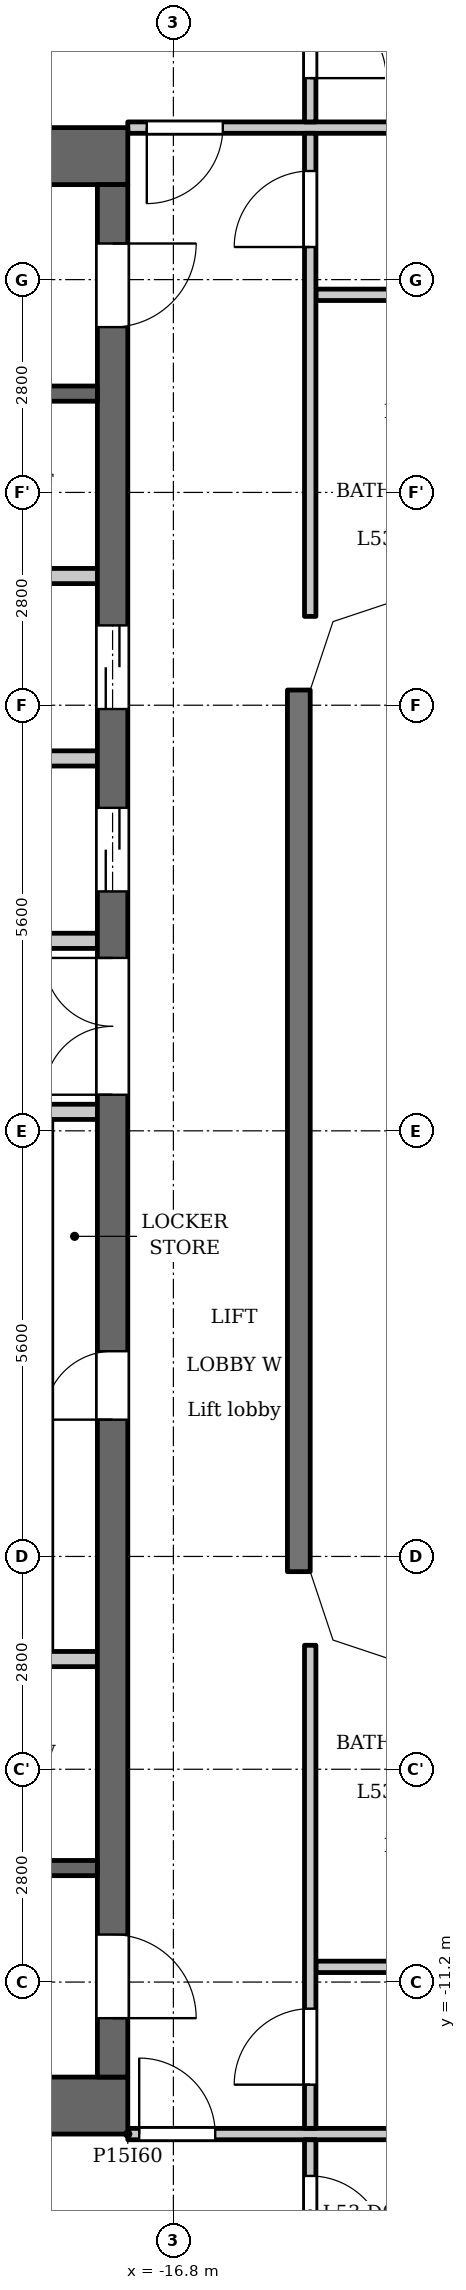
"""IFC4 building model, lengths in metres.
Left out: names, types, materials, properties, quantities, classifications, styles, units other than length and angle.
Written with IfcOpenShell. Run it as: python <this file> out.ifc"""

import sys

from ifc_helpers import new_model, si_unit, direction, frame, frame_2d, origin, place, context, subcontext, project, spatial, polyline, rectangle, outline, extrude, element, fill, save


model = new_model("IFC4")
c1 = context("Model", 3, precision=1e-05, world=origin(), true_north=direction((0.0, 1.0)))
c2 = subcontext(c1, "Body", "Model", "MODEL_VIEW")
j1 = project(units=[si_unit("LENGTHUNIT", "METRE"), si_unit("PLANEANGLEUNIT", "RADIAN")], contexts=[c1])
p1 = place(None, origin())
s1 = spatial("IfcSite", under=j1, at=p1, CompositionType="ELEMENT")
p2 = place(p1, origin())
s2 = spatial("IfcBuilding", under=s1, at=p2, CompositionType="ELEMENT")
p3 = place(p2, frame((0.0, 0.0, 206.4)))
s3 = spatial("IfcBuildingStorey", under=s2, at=p3, CompositionType="ELEMENT", Elevation=206.4)
p4 = place(p3, frame((-15.15, -5.8, 0.0), z_axis=(0.0, 0.0, 1.0), x_axis=(0.0, 1.0, 0.0)))
e1 = element("IfcWall", 1, at=p4, inside=s3, PredefinedType="SOLIDWALL", context=c2, shape_type="SweptSolid", body=[
    extrude(rectangle(XDim=11.6, YDim=0.3, at=frame_2d((5.8, 0.0))), origin(), (0.0, 0.0, 1.0), 3.2),
])
for number, where, z_axis, x_axis in (
    (2, (-17.4, 12.825, 0.0), (0.0, 0.0, 1.0), (-1.0, 0.0, 0.0)),
    (3, (-17.4, -12.825, 0.0), (0.0, 0.0, 1.0), (-1.0, 0.0, 0.0)),
):
    element("IfcWall", number, at=place(p3, frame(where, z_axis=z_axis, x_axis=x_axis)), inside=s3, PredefinedType="SHEAR", context=c2, shape_type="SweptSolid", body=[
        extrude(rectangle(XDim=7.6, YDim=0.75, at=frame_2d((3.8, 0.0))), origin(), (0.0, 0.0, 1.0), 3.2),
    ])
p5 = place(p3, frame((-17.6, -12.45, 0.0), z_axis=(0.0, 0.0, 1.0), x_axis=(0.0, 1.0, 0.0)))
e4 = element("IfcWall", 4, at=p5, inside=s3, PredefinedType="SHEAR", context=c2, shape_type="SweptSolid", body=[
    extrude(rectangle(XDim=24.9, YDim=0.4, at=frame_2d((12.45, 0.0))), origin(), (0.0, 0.0, 1.0), 3.2),
])
p6 = place(p5, frame((8.65, 0.0, 0.0)))
e5 = element("IfcOpeningElement", 5, at=p6, cuts=e4, PredefinedType="OPENING", context=c2, shape_type="SweptSolid", body=[
    extrude(rectangle(XDim=0.9, YDim=2.1, at=frame_2d((0.45, 1.05))), frame((0.0, 0.21, 0.0), z_axis=(0.0, -1.0, 0.0), x_axis=(1.0, 0.0, 0.0)), (0.0, 0.0, 1.0), 0.42),
])
p7 = place(p5, frame((15.6, 0.0, 0.0)))
e6 = element("IfcOpeningElement", 6, at=p7, cuts=e4, PredefinedType="OPENING", context=c2, shape_type="SweptSolid", body=[
    extrude(rectangle(XDim=1.1, YDim=2.1, at=frame_2d((0.55, 1.05))), frame((0.0, 0.21, 0.0), z_axis=(0.0, -1.0, 0.0), x_axis=(1.0, 0.0, 0.0)), (0.0, 0.0, 1.0), 0.42),
])
p8 = place(p5, frame((18.0, 0.0, 0.0)))
e7 = element("IfcOpeningElement", 7, at=p8, cuts=e4, PredefinedType="OPENING", context=c2, shape_type="SweptSolid", body=[
    extrude(rectangle(XDim=1.1, YDim=2.1, at=frame_2d((0.55, 1.05))), frame((0.0, 0.21, 0.0), z_axis=(0.0, -1.0, 0.0), x_axis=(1.0, 0.0, 0.0)), (0.0, 0.0, 1.0), 0.42),
])
p9 = place(p5, frame((23.025, 0.0, 0.0)))
e8 = element("IfcOpeningElement", 8, at=p9, cuts=e4, PredefinedType="OPENING", context=c2, shape_type="SweptSolid", body=[
    extrude(rectangle(XDim=1.1, YDim=2.1, at=frame_2d((0.55, 1.05))), frame((0.0, 0.21, 0.0), z_axis=(0.0, -1.0, 0.0), x_axis=(1.0, 0.0, 0.0)), (0.0, 0.0, 1.0), 0.42),
])
p10 = place(p5, frame((0.775, 0.0, 0.0)))
e9 = element("IfcOpeningElement", 9, at=p10, cuts=e4, PredefinedType="OPENING", context=c2, shape_type="SweptSolid", body=[
    extrude(rectangle(XDim=1.1, YDim=2.1, at=frame_2d((0.55, 1.05))), frame((0.0, 0.21, 0.0), z_axis=(0.0, -1.0, 0.0), x_axis=(1.0, 0.0, 0.0)), (0.0, 0.0, 1.0), 0.42),
])
p11 = place(p5, frame((12.925, 0.0, 0.0)))
e10 = element("IfcOpeningElement", 10, at=p11, cuts=e4, PredefinedType="OPENING", context=c2, shape_type="SweptSolid", body=[
    extrude(rectangle(XDim=1.8, YDim=2.1, at=frame_2d((0.9, 1.05))), frame((0.0, 0.21, 0.0), z_axis=(0.0, -1.0, 0.0), x_axis=(1.0, 0.0, 0.0)), (0.0, 0.0, 1.0), 0.42),
])
p12 = place(p3, frame((-17.8, -9.7, 0.0), z_axis=(0.0, 0.0, 1.0), x_axis=(-1.0, 0.0, 0.0)))
e11 = element("IfcWall", 11, at=p12, inside=s3, PredefinedType="SHEAR", context=c2, shape_type="SweptSolid", body=[
    extrude(rectangle(XDim=5.65, YDim=0.2, at=frame_2d((2.825, 0.0))), origin(), (0.0, 0.0, 1.0), 3.2),
])
p13 = place(p12, frame((0.85, 0.0, 0.0)))
e12 = element("IfcOpeningElement", 12, at=p13, cuts=e11, PredefinedType="OPENING", context=c2, shape_type="SweptSolid", body=[
    extrude(rectangle(XDim=1.1, YDim=2.1, at=frame_2d((0.55, 1.05))), frame((0.0, 0.11, 0.0), z_axis=(0.0, -1.0, 0.0), x_axis=(1.0, 0.0, 0.0)), (0.0, 0.0, 1.0), 0.22),
])
p14 = place(p12, frame((3.75, 0.0, 0.0)))
e13 = element("IfcOpeningElement", 13, at=p14, cuts=e11, PredefinedType="OPENING", context=c2, shape_type="SweptSolid", body=[
    extrude(rectangle(XDim=1.1, YDim=2.1, at=frame_2d((0.55, 1.05))), frame((0.0, 0.11, 0.0), z_axis=(0.0, -1.0, 0.0), x_axis=(1.0, 0.0, 0.0)), (0.0, 0.0, 1.0), 0.22),
])
p15 = place(p3, frame((-17.8, -6.95, 0.0), z_axis=(0.0, 0.0, 1.0), x_axis=(-1.0, 0.0, 0.0)))
e14 = element("IfcWall", 14, at=p15, inside=s3, PredefinedType="PARTITIONING", context=c2, shape_type="SweptSolid", body=[
    extrude(rectangle(XDim=2.8, YDim=0.2, at=frame_2d((1.4, 0.0))), origin(), (0.0, 0.0, 1.0), 3.2),
])
p16 = place(p3, frame((-17.8, 0.25, 0.0), z_axis=(0.0, 0.0, 1.0), x_axis=(-1.0, 0.0, 0.0)))
e15 = element("IfcWall", 15, at=p16, inside=s3, PredefinedType="PARTITIONING", context=c2, shape_type="SweptSolid", body=[
    extrude(rectangle(XDim=3.0, YDim=0.2, at=frame_2d((1.5, 0.0))), origin(), (0.0, 0.0, 1.0), 3.2),
])
p17 = place(p16, frame((1.35, 0.0, 0.0)))
e16 = element("IfcOpeningElement", 16, at=p17, cuts=e15, PredefinedType="OPENING", context=c2, shape_type="SweptSolid", body=[
    extrude(rectangle(XDim=0.9, YDim=2.1, at=frame_2d((0.45, 1.05))), frame((0.0, 0.11, 0.0), z_axis=(0.0, -1.0, 0.0), x_axis=(1.0, 0.0, 0.0)), (0.0, 0.0, 1.0), 0.22),
])
p18 = place(p3, frame((-17.8, 2.5, 0.0), z_axis=(0.0, 0.0, 1.0), x_axis=(-1.0, 0.0, 0.0)))
e17 = element("IfcWall", 17, at=p18, inside=s3, PredefinedType="PARTITIONING", context=c2, shape_type="SweptSolid", body=[
    extrude(rectangle(XDim=3.0, YDim=0.2, at=frame_2d((1.5, 0.0))), origin(), (0.0, 0.0, 1.0), 3.2),
])
for number, where, z_axis, x_axis in (
    (18, (-17.8, 4.9, 0.0), (0.0, 0.0, 1.0), (-1.0, 0.0, 0.0)),
    (19, (-17.8, 7.3, 0.0), (0.0, 0.0, 1.0), (-1.0, 0.0, 0.0)),
):
    element("IfcWall", number, at=place(p3, frame(where, z_axis=z_axis, x_axis=x_axis)), inside=s3, PredefinedType="PARTITIONING", context=c2, shape_type="SweptSolid", body=[
        extrude(rectangle(XDim=2.8, YDim=0.2, at=frame_2d((1.4, 0.0))), origin(), (0.0, 0.0, 1.0), 3.2),
    ])
p19 = place(p3, frame((-17.8, 9.7, 0.0), z_axis=(0.0, 0.0, 1.0), x_axis=(-1.0, 0.0, 0.0)))
e20 = element("IfcWall", 20, at=p19, inside=s3, PredefinedType="SHEAR", context=c2, shape_type="SweptSolid", body=[
    extrude(rectangle(XDim=5.65, YDim=0.2, at=frame_2d((2.825, 0.0))), origin(), (0.0, 0.0, 1.0), 3.2),
])
p20 = place(p19, frame((0.85, 0.0, 0.0)))
e21 = element("IfcOpeningElement", 21, at=p20, cuts=e20, PredefinedType="OPENING", context=c2, shape_type="SweptSolid", body=[
    extrude(rectangle(XDim=1.1, YDim=2.1, at=frame_2d((0.55, 1.05))), frame((0.0, 0.11, 0.0), z_axis=(0.0, -1.0, 0.0), x_axis=(1.0, 0.0, 0.0)), (0.0, 0.0, 1.0), 0.22),
])
p21 = place(p19, frame((3.75, 0.0, 0.0)))
e22 = element("IfcOpeningElement", 22, at=p21, cuts=e20, PredefinedType="OPENING", context=c2, shape_type="SweptSolid", body=[
    extrude(rectangle(XDim=1.1, YDim=2.1, at=frame_2d((0.55, 1.05))), frame((0.0, 0.11, 0.0), z_axis=(0.0, -1.0, 0.0), x_axis=(1.0, 0.0, 0.0)), (0.0, 0.0, 1.0), 0.22),
])
p22 = place(p3, frame((-17.4, -13.2, 0.0), z_axis=(0.0, 0.0, 1.0), x_axis=(1.0, 0.0, 0.0)))
e23 = element("IfcWall", 23, at=p22, inside=s3, PredefinedType="PARTITIONING", context=c2, shape_type="SweptSolid", body=[
    extrude(rectangle(XDim=34.8, YDim=0.15, at=frame_2d((17.4, 0.0))), origin(), (0.0, 0.0, 1.0), 3.2),
])
p23 = place(p22, frame((0.15, 0.0, 0.0)))
e24 = element("IfcOpeningElement", 24, at=p23, cuts=e23, PredefinedType="OPENING", context=c2, shape_type="SweptSolid", body=[
    extrude(rectangle(XDim=1.0, YDim=2.1, at=frame_2d((0.5, 1.05))), frame((0.0, 0.085, 0.0), z_axis=(0.0, -1.0, 0.0), x_axis=(1.0, 0.0, 0.0)), (0.0, 0.0, 1.0), 0.17),
])
p24 = place(p22, frame((33.55, 0.0, 0.0)))
e25 = element("IfcOpeningElement", 25, at=p24, cuts=e23, PredefinedType="OPENING", context=c2, shape_type="SweptSolid", body=[
    extrude(rectangle(XDim=1.0, YDim=2.1, at=frame_2d((0.5, 1.05))), frame((0.0, 0.085, 0.0), z_axis=(0.0, -1.0, 0.0), x_axis=(1.0, 0.0, 0.0)), (0.0, 0.0, 1.0), 0.17),
])
p25 = place(p3, frame((-14.925, -11.0, 0.0), z_axis=(0.0, 0.0, 1.0), x_axis=(1.0, 0.0, 0.0)))
e26 = element("IfcWall", 26, at=p25, inside=s3, PredefinedType="PARTITIONING", context=c2, shape_type="SweptSolid", body=[
    extrude(rectangle(XDim=29.85, YDim=0.15, at=frame_2d((14.925, 0.0))), origin(), (0.0, 0.0, 1.0), 3.2),
])
p26 = place(p25, frame((2.575, 0.0, 0.0)))
e27 = element("IfcOpeningElement", 27, at=p26, cuts=e26, PredefinedType="OPENING", context=c2, shape_type="SweptSolid", body=[
    extrude(rectangle(XDim=1.0, YDim=2.1, at=frame_2d((0.5, 1.05))), frame((0.0, 0.085, 0.0), z_axis=(0.0, -1.0, 0.0), x_axis=(1.0, 0.0, 0.0)), (0.0, 0.0, 1.0), 0.17),
])
p27 = place(p25, frame((26.375, 0.0, 0.0)))
e28 = element("IfcOpeningElement", 28, at=p27, cuts=e26, PredefinedType="OPENING", context=c2, shape_type="SweptSolid", body=[
    extrude(rectangle(XDim=1.0, YDim=2.1, at=frame_2d((0.5, 1.05))), frame((0.0, 0.085, 0.0), z_axis=(0.0, -1.0, 0.0), x_axis=(1.0, 0.0, 0.0)), (0.0, 0.0, 1.0), 0.17),
])
p28 = place(p3, frame((-14.925, 11.0, 0.0), z_axis=(0.0, 0.0, 1.0), x_axis=(1.0, 0.0, 0.0)))
e29 = element("IfcWall", 29, at=p28, inside=s3, PredefinedType="PARTITIONING", context=c2, shape_type="SweptSolid", body=[
    extrude(rectangle(XDim=29.85, YDim=0.15, at=frame_2d((14.925, 0.0))), origin(), (0.0, 0.0, 1.0), 3.2),
])
p29 = place(p28, frame((2.475, 0.0, 0.0)))
e30 = element("IfcOpeningElement", 30, at=p29, cuts=e29, PredefinedType="OPENING", context=c2, shape_type="SweptSolid", body=[
    extrude(rectangle(XDim=1.0, YDim=2.1, at=frame_2d((0.5, 1.05))), frame((0.0, 0.085, 0.0), z_axis=(0.0, -1.0, 0.0), x_axis=(1.0, 0.0, 0.0)), (0.0, 0.0, 1.0), 0.17),
])
p30 = place(p28, frame((17.975, 0.0, 0.0)))
e31 = element("IfcOpeningElement", 31, at=p30, cuts=e29, PredefinedType="OPENING", context=c2, shape_type="SweptSolid", body=[
    extrude(rectangle(XDim=1.0, YDim=2.1, at=frame_2d((0.5, 1.05))), frame((0.0, 0.085, 0.0), z_axis=(0.0, -1.0, 0.0), x_axis=(1.0, 0.0, 0.0)), (0.0, 0.0, 1.0), 0.17),
])
p31 = place(p3, frame((-17.4, 13.2, 0.0), z_axis=(0.0, 0.0, 1.0), x_axis=(1.0, 0.0, 0.0)))
e32 = element("IfcWall", 32, at=p31, inside=s3, PredefinedType="PARTITIONING", context=c2, shape_type="SweptSolid", body=[
    extrude(rectangle(XDim=34.8, YDim=0.15, at=frame_2d((17.4, 0.0))), origin(), (0.0, 0.0, 1.0), 3.2),
])
p32 = place(p31, frame((0.25, 0.0, 0.0)))
e33 = element("IfcOpeningElement", 33, at=p32, cuts=e32, PredefinedType="OPENING", context=c2, shape_type="SweptSolid", body=[
    extrude(rectangle(XDim=1.0, YDim=2.1, at=frame_2d((0.5, 1.05))), frame((0.0, 0.085, 0.0), z_axis=(0.0, -1.0, 0.0), x_axis=(1.0, 0.0, 0.0)), (0.0, 0.0, 1.0), 0.17),
])
p33 = place(p31, frame((33.65, 0.0, 0.0)))
e34 = element("IfcOpeningElement", 34, at=p33, cuts=e32, PredefinedType="OPENING", context=c2, shape_type="SweptSolid", body=[
    extrude(rectangle(XDim=1.0, YDim=2.1, at=frame_2d((0.5, 1.05))), frame((0.0, 0.085, 0.0), z_axis=(0.0, -1.0, 0.0), x_axis=(1.0, 0.0, 0.0)), (0.0, 0.0, 1.0), 0.17),
])
p34 = place(p3, frame((-15.0, -15.325, 0.0), z_axis=(0.0, 0.0, 1.0), x_axis=(0.0, 1.0, 0.0)))
e35 = element("IfcWall", 35, at=p34, inside=s3, PredefinedType="PARTITIONING", context=c2, shape_type="SweptSolid", body=[
    extrude(rectangle(XDim=2.05, YDim=0.15, at=frame_2d((1.025, 0.0))), origin(), (0.0, 0.0, 1.0), 3.2),
])
p35 = place(p34, frame((0.574, 0.0, 0.0)))
e36 = element("IfcOpeningElement", 36, at=p35, cuts=e35, PredefinedType="OPENING", context=c2, shape_type="SweptSolid", body=[
    extrude(rectangle(XDim=1.0, YDim=2.1, at=frame_2d((0.5, 1.05))), frame((0.0, 0.085, 0.0), z_axis=(0.0, -1.0, 0.0), x_axis=(1.0, 0.0, 0.0)), (0.0, 0.0, 1.0), 0.17),
])
p36 = place(p3, frame((-15.0, -13.125, 0.0), z_axis=(0.0, 0.0, 1.0), x_axis=(0.0, 1.0, 0.0)))
e37 = element("IfcWall", 37, at=p36, inside=s3, PredefinedType="PARTITIONING", context=c2, shape_type="SweptSolid", body=[
    extrude(rectangle(XDim=6.356, YDim=0.15, at=frame_2d((3.178, 0.0))), origin(), (0.0, 0.0, 1.0), 3.2),
])
p37 = place(p36, frame((0.575, 0.0, 0.0)))
e38 = element("IfcOpeningElement", 38, at=p37, cuts=e37, PredefinedType="OPENING", context=c2, shape_type="SweptSolid", body=[
    extrude(rectangle(XDim=1.0, YDim=2.1, at=frame_2d((0.5, 1.05))), frame((0.0, 0.085, 0.0), z_axis=(0.0, -1.0, 0.0), x_axis=(1.0, 0.0, 0.0)), (0.0, 0.0, 1.0), 0.17),
])
p38 = place(p3, frame((-15.0, 6.769, 0.0), z_axis=(0.0, 0.0, 1.0), x_axis=(0.0, 1.0, 0.0)))
e39 = element("IfcWall", 39, at=p38, inside=s3, PredefinedType="PARTITIONING", context=c2, shape_type="SweptSolid", body=[
    extrude(rectangle(XDim=6.356, YDim=0.15, at=frame_2d((3.178, 0.0))), origin(), (0.0, 0.0, 1.0), 3.2),
])
p39 = place(p38, frame((4.86, 0.0, 0.0)))
e40 = element("IfcOpeningElement", 40, at=p39, cuts=e39, PredefinedType="OPENING", context=c2, shape_type="SweptSolid", body=[
    extrude(rectangle(XDim=1.0, YDim=2.1, at=frame_2d((0.5, 1.05))), frame((0.0, 0.085, 0.0), z_axis=(0.0, -1.0, 0.0), x_axis=(1.0, 0.0, 0.0)), (0.0, 0.0, 1.0), 0.17),
])
p40 = place(p3, frame((-15.0, 13.275, 0.0), z_axis=(0.0, 0.0, 1.0), x_axis=(0.0, 1.0, 0.0)))
e41 = element("IfcWall", 41, at=p40, inside=s3, PredefinedType="PARTITIONING", context=c2, shape_type="SweptSolid", body=[
    extrude(rectangle(XDim=2.05, YDim=0.15, at=frame_2d((1.025, 0.0))), origin(), (0.0, 0.0, 1.0), 3.2),
])
p41 = place(p40, frame((0.576, 0.0, 0.0)))
e42 = element("IfcOpeningElement", 42, at=p41, cuts=e41, PredefinedType="OPENING", context=c2, shape_type="SweptSolid", body=[
    extrude(rectangle(XDim=1.0, YDim=2.1, at=frame_2d((0.5, 1.05))), frame((0.0, 0.085, 0.0), z_axis=(0.0, -1.0, 0.0), x_axis=(1.0, 0.0, 0.0)), (0.0, 0.0, 1.0), 0.17),
])
p42 = place(p3, origin())
e43 = element("IfcWall", 43, at=p42, inside=s3, PredefinedType="SOLIDWALL", context=c2, shape_type="SweptSolid", body=[
    extrude(outline(polyline([(-13.849, 7.3), (-14.937, 6.937), (-15.3, 5.849), (-15.3, 5.8), (-15.0, 5.8), (-14.7, 6.7), (-13.8, 7.0), (-13.8, 7.3), (-13.849, 7.3)])), origin(), (0.0, 0.0, 1.0), 3.2),
])
e44 = element("IfcWall", 44, at=p42, inside=s3, PredefinedType="SOLIDWALL", context=c2, shape_type="SweptSolid", body=[
    extrude(outline(polyline([(-14.937, -6.937), (-13.849, -7.3), (-13.8, -7.3), (-13.8, -7.0), (-14.7, -6.7), (-15.0, -5.8), (-15.3, -5.8), (-15.3, -5.849), (-14.937, -6.937)])), origin(), (0.0, 0.0, 1.0), 3.2),
])
p43 = place(p6, origin())
e45 = element("IfcDoor", 45, at=p43, inside=s3, OperationType="SINGLE_SWING_RIGHT", PredefinedType="DOOR", context=c2, shape_type="SweptSolid", body=[
    extrude(rectangle(XDim=0.9, YDim=2.1, at=frame_2d((0.45, 1.05))), frame((0.0, 0.025, 0.0), z_axis=(0.0, -1.0, 0.0), x_axis=(1.0, 0.0, 0.0)), (0.0, 0.0, 1.0), 0.05),
])
fill(e5, e45)
p44 = place(p7, origin())
e46 = element("IfcDoor", 46, at=p44, inside=s3, OperationType="DOUBLE_DOOR_SLIDING", PredefinedType="DOOR", context=c2, shape_type="SweptSolid", body=[
    extrude(rectangle(XDim=1.1, YDim=2.1, at=frame_2d((0.55, 1.05))), frame((0.0, 0.025, 0.0), z_axis=(0.0, -1.0, 0.0), x_axis=(1.0, 0.0, 0.0)), (0.0, 0.0, 1.0), 0.05),
])
fill(e6, e46)
p45 = place(p8, origin())
e47 = element("IfcDoor", 47, at=p45, inside=s3, OperationType="DOUBLE_DOOR_SLIDING", PredefinedType="DOOR", context=c2, shape_type="SweptSolid", body=[
    extrude(rectangle(XDim=1.1, YDim=2.1, at=frame_2d((0.55, 1.05))), frame((0.0, 0.025, 0.0), z_axis=(0.0, -1.0, 0.0), x_axis=(1.0, 0.0, 0.0)), (0.0, 0.0, 1.0), 0.05),
])
fill(e7, e47)
p46 = place(p9, origin())
e48 = element("IfcDoor", 48, at=p46, inside=s3, OperationType="SINGLE_SWING_RIGHT", PredefinedType="DOOR", context=c2, shape_type="SweptSolid", body=[
    extrude(rectangle(XDim=1.1, YDim=2.1, at=frame_2d((0.55, 1.05))), frame((0.0, 0.025, 0.0), z_axis=(0.0, -1.0, 0.0), x_axis=(1.0, 0.0, 0.0)), (0.0, 0.0, 1.0), 0.05),
])
fill(e8, e48)
p47 = place(p10, origin())
e49 = element("IfcDoor", 49, at=p47, inside=s3, OperationType="SINGLE_SWING_LEFT", PredefinedType="DOOR", context=c2, shape_type="SweptSolid", body=[
    extrude(rectangle(XDim=1.1, YDim=2.1, at=frame_2d((0.55, 1.05))), frame((0.0, 0.025, 0.0), z_axis=(0.0, -1.0, 0.0), x_axis=(1.0, 0.0, 0.0)), (0.0, 0.0, 1.0), 0.05),
])
fill(e9, e49)
p48 = place(p11, origin())
e50 = element("IfcDoor", 50, at=p48, inside=s3, OperationType="DOUBLE_DOOR_SINGLE_SWING", PredefinedType="DOOR", context=c2, shape_type="SweptSolid", body=[
    extrude(rectangle(XDim=1.8, YDim=2.1, at=frame_2d((0.9, 1.05))), frame((0.0, 0.025, 0.0), z_axis=(0.0, -1.0, 0.0), x_axis=(1.0, 0.0, 0.0)), (0.0, 0.0, 1.0), 0.05),
])
fill(e10, e50)
p49 = place(p39, origin())
e51 = element("IfcDoor", 51, at=p49, inside=s3, OperationType="SINGLE_SWING_RIGHT", PredefinedType="DOOR", context=c2, shape_type="SweptSolid", body=[
    extrude(rectangle(XDim=1.0, YDim=2.1, at=frame_2d((0.5, 1.05))), frame((0.0, 0.025, 0.0), z_axis=(0.0, -1.0, 0.0), x_axis=(1.0, 0.0, 0.0)), (0.0, 0.0, 1.0), 0.05),
])
fill(e40, e51)
p50 = place(p32, origin())
e52 = element("IfcDoor", 52, at=p50, inside=s3, OperationType="SINGLE_SWING_LEFT", PredefinedType="DOOR", context=c2, shape_type="SweptSolid", body=[
    extrude(rectangle(XDim=1.0, YDim=2.1, at=frame_2d((0.5, 1.05))), frame((0.0, 0.025, 0.0), z_axis=(0.0, -1.0, 0.0), x_axis=(1.0, 0.0, 0.0)), (0.0, 0.0, 1.0), 0.05),
])
fill(e33, e52)
p51 = place(p37, origin())
e53 = element("IfcDoor", 53, at=p51, inside=s3, OperationType="SINGLE_SWING_RIGHT", PredefinedType="DOOR", context=c2, shape_type="SweptSolid", body=[
    extrude(rectangle(XDim=1.0, YDim=2.1, at=frame_2d((0.5, 1.05))), frame((0.0, 0.025, 0.0), z_axis=(0.0, -1.0, 0.0), x_axis=(1.0, 0.0, 0.0)), (0.0, 0.0, 1.0), 0.05),
])
fill(e38, e53)
p52 = place(p23, origin())
e54 = element("IfcDoor", 54, at=p52, inside=s3, OperationType="SINGLE_SWING_RIGHT", PredefinedType="DOOR", context=c2, shape_type="SweptSolid", body=[
    extrude(rectangle(XDim=1.0, YDim=2.1, at=frame_2d((0.5, 1.05))), frame((0.0, 0.025, 0.0), z_axis=(0.0, -1.0, 0.0), x_axis=(1.0, 0.0, 0.0)), (0.0, 0.0, 1.0), 0.05),
])
fill(e24, e54)
p53 = place(p41, origin())
e55 = element("IfcDoor", 55, at=p53, inside=s3, OperationType="SINGLE_SWING_LEFT", PredefinedType="DOOR", context=c2, shape_type="SweptSolid", body=[
    extrude(rectangle(XDim=1.0, YDim=2.1, at=frame_2d((0.5, 1.05))), frame((0.0, 0.025, 0.0), z_axis=(0.0, -1.0, 0.0), x_axis=(1.0, 0.0, 0.0)), (0.0, 0.0, 1.0), 0.05),
])
fill(e42, e55)
p54 = place(p35, origin())
e56 = element("IfcDoor", 56, at=p54, inside=s3, OperationType="SINGLE_SWING_LEFT", PredefinedType="DOOR", context=c2, shape_type="SweptSolid", body=[
    extrude(rectangle(XDim=1.0, YDim=2.1, at=frame_2d((0.5, 1.05))), frame((0.0, 0.025, 0.0), z_axis=(0.0, -1.0, 0.0), x_axis=(1.0, 0.0, 0.0)), (0.0, 0.0, 1.0), 0.05),
])
fill(e36, e56)
save(model, sys.argv[1])
